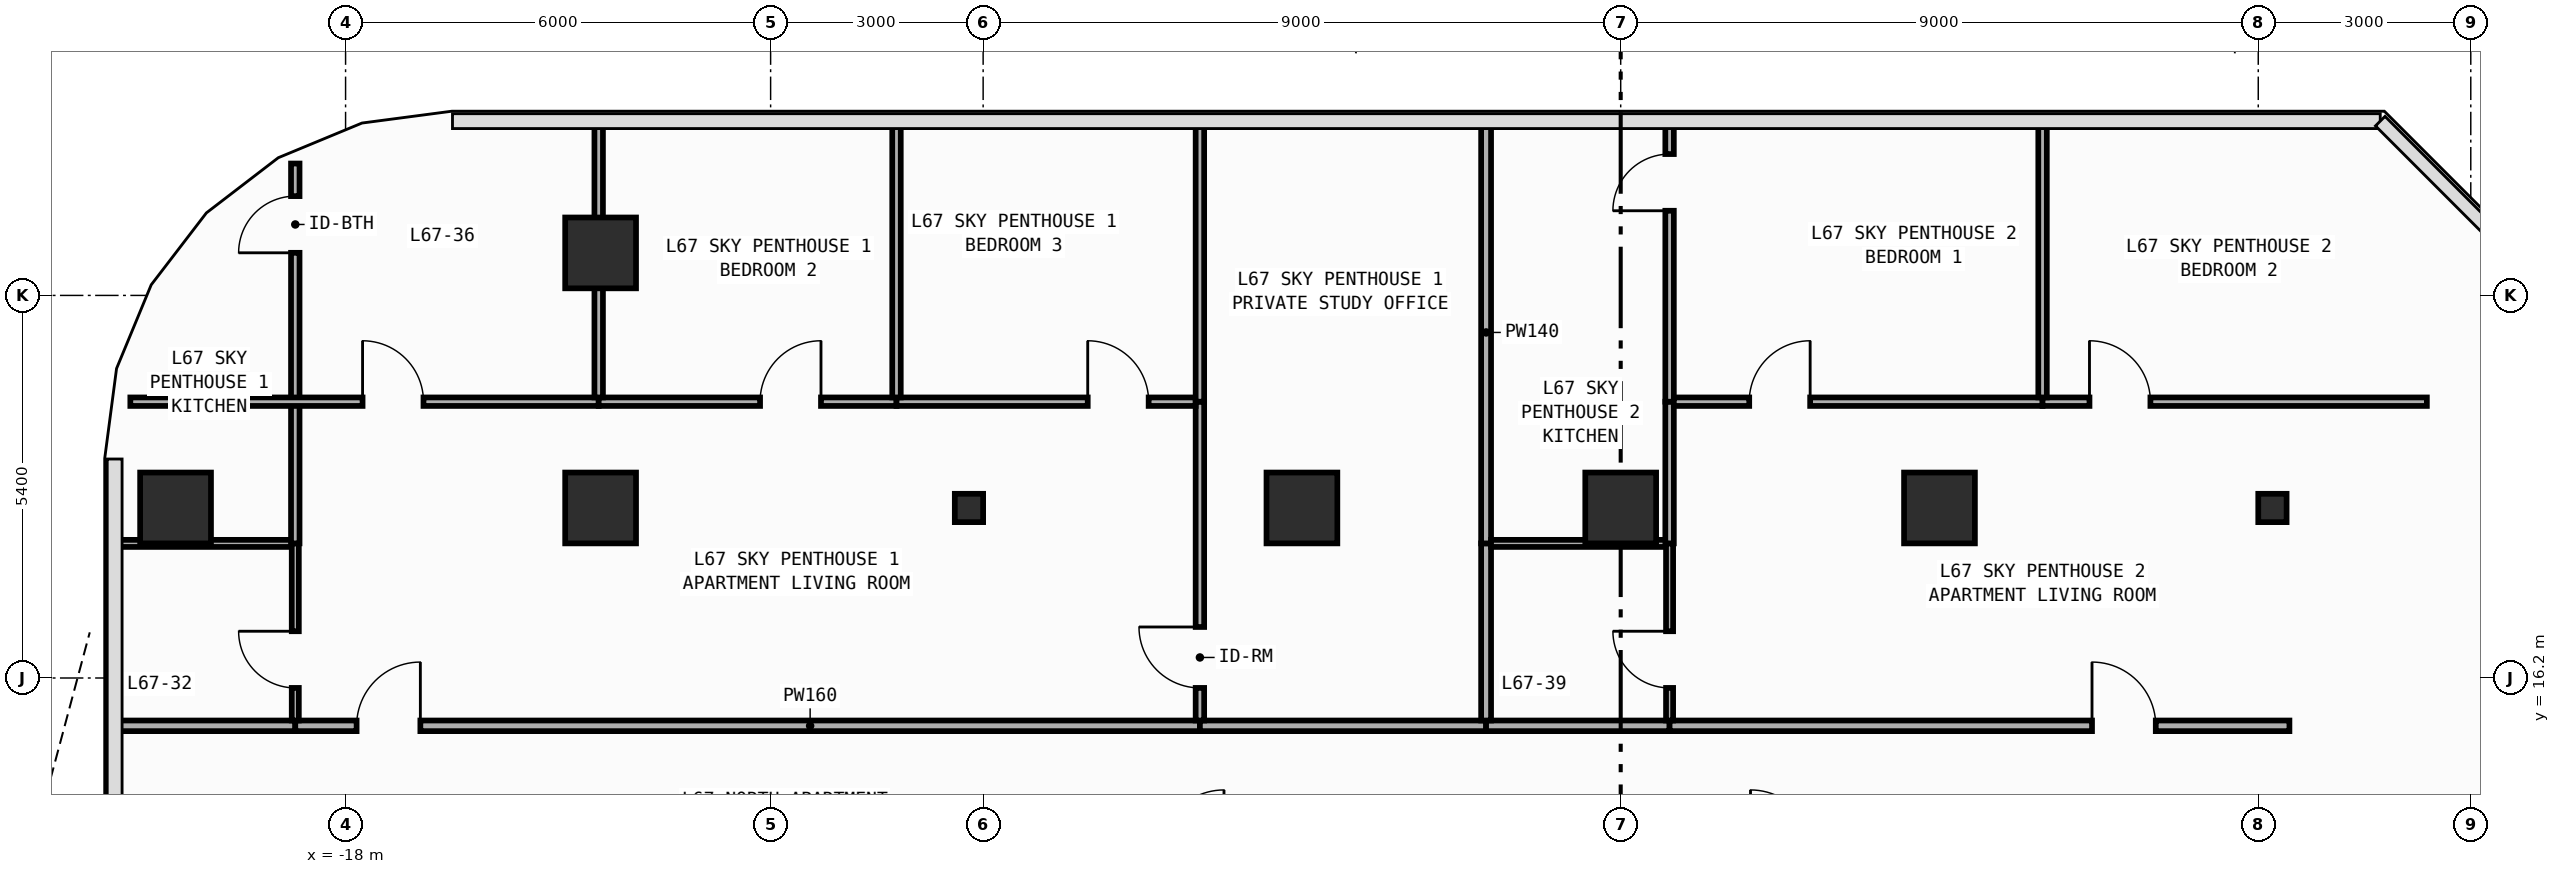
"""IFC4 building model, lengths in metres.
Left out: names, types, materials, properties, quantities, classifications, styles, units other than length and angle.
Written with IfcOpenShell. Run it as: python <this file> out.ifc"""

import sys

from ifc_helpers import new_model, si_unit, direction, frame, frame_2d, origin, origin_2d, place, context, subcontext, project, spatial, rectangle, circle, i_section, extrude, element, fill, save


model = new_model("IFC4")
c1 = context("Model", 3, precision=1e-05, world=origin(), true_north=direction((0.0, 1.0)))
c2 = subcontext(c1, "Body", "Model", "MODEL_VIEW")
j1 = project(units=[si_unit("LENGTHUNIT", "METRE"), si_unit("PLANEANGLEUNIT", "RADIAN")], contexts=[c1])
p1 = place(None, origin())
s1 = spatial("IfcSite", under=j1, at=p1, CompositionType="ELEMENT")
p2 = place(p1, origin())
s2 = spatial("IfcBuilding", under=s1, at=p2, CompositionType="ELEMENT")
p3 = place(p2, frame((0.0, 0.0, 281.4)))
s3 = spatial("IfcBuildingStorey", under=s2, at=p3, CompositionType="ELEMENT", Elevation=281.4)
for number, where, z_axis, x_axis in (
    (1, (-9.2, 18.6, 0.0), (0.0, 0.0, 1.0), (1.0, 0.0, 0.0)),
    (2, (9.2, 18.6, 0.0), (0.0, 0.0, 1.0), (1.0, 0.0, 0.0)),
):
    element("IfcColumn", number, at=place(p3, frame(where, z_axis=z_axis, x_axis=x_axis)), inside=s3, PredefinedType="COLUMN", context=c2, shape_type="SweptSolid", body=[
        extrude(i_section(OverallWidth=0.4, OverallDepth=0.4, WebThickness=0.013, FlangeThickness=0.021, FilletRadius=0.022, at=origin_2d()), origin(), (0.0, 0.0, 1.0), 3.8),
    ])
for number, where, z_axis, x_axis in (
    (3, (-20.4, 18.6, 0.0), (0.0, 0.0, 1.0), (1.0, 0.0, 0.0)),
    (4, (-14.4, 18.6, 0.0), (0.0, 0.0, 1.0), (1.0, 0.0, 0.0)),
    (5, (-4.5, 18.6, 0.0), (0.0, 0.0, 1.0), (1.0, 0.0, 0.0)),
    (6, (0.0, 18.6, 0.0), (0.0, 0.0, 1.0), (1.0, 0.0, 0.0)),
    (7, (4.5, 18.6, 0.0), (0.0, 0.0, 1.0), (1.0, 0.0, 0.0)),
    (8, (-14.4, 22.2, 0.0), (0.0, 0.0, 1.0), (1.0, 0.0, 0.0)),
):
    element("IfcColumn", number, at=place(p3, frame(where, z_axis=z_axis, x_axis=x_axis)), inside=s3, PredefinedType="COLUMN", context=c2, shape_type="SweptSolid", body=[
        extrude(circle(Radius=0.5, at=origin_2d()), origin(), (0.0, 0.0, 1.0), 3.8),
    ])
p4 = place(p3, frame((-21.255, 15.525, 0.0), z_axis=(0.0, 0.0, 1.0), x_axis=(1.0, 0.0, 0.0)))
e9 = element("IfcWall", 9, at=p4, inside=s3, PredefinedType="PARTITIONING", context=c2, shape_type="SweptSolid", body=[
    extrude(rectangle(XDim=2.545, YDim=0.15, at=frame_2d((1.272, 0.0))), origin(), (0.0, 0.0, 1.0), 3.54),
])
p5 = place(p3, frame((-18.71, 15.525, 0.0), z_axis=(0.0, 0.0, 1.0), x_axis=(1.0, 0.0, 0.0)))
e10 = element("IfcWall", 10, at=p5, inside=s3, PredefinedType="PARTITIONING", context=c2, shape_type="SweptSolid", body=[
    extrude(rectangle(XDim=12.77, YDim=0.15, at=frame_2d((6.385, 0.0))), origin(), (0.0, 0.0, 1.0), 3.54),
])
p6 = place(p5, frame((0.865, 0.0, 0.0)))
e11 = element("IfcOpeningElement", 11, at=p6, cuts=e10, PredefinedType="OPENING", context=c2, shape_type="SweptSolid", body=[
    extrude(rectangle(XDim=0.9, YDim=2.15, at=frame_2d((0.45, 1.075))), frame((0.0, 0.085, 0.0), z_axis=(0.0, -1.0, 0.0), x_axis=(1.0, 0.0, 0.0)), (0.0, 0.0, 1.0), 0.17),
])
p7 = place(p3, frame((-5.94, 15.525, 0.0), z_axis=(0.0, 0.0, 1.0), x_axis=(1.0, 0.0, 0.0)))
e12 = element("IfcWall", 12, at=p7, inside=s3, PredefinedType="PARTITIONING", context=c2, shape_type="SweptSolid", body=[
    extrude(rectangle(XDim=4.04, YDim=0.15, at=frame_2d((2.02, 0.0))), origin(), (0.0, 0.0, 1.0), 3.54),
])
p8 = place(p3, frame((-1.9, 15.525, 0.0), z_axis=(0.0, 0.0, 1.0), x_axis=(1.0, 0.0, 0.0)))
e13 = element("IfcWall", 13, at=p8, inside=s3, PredefinedType="PARTITIONING", context=c2, shape_type="SweptSolid", body=[
    extrude(rectangle(XDim=2.59, YDim=0.15, at=frame_2d((1.295, 0.0))), origin(), (0.0, 0.0, 1.0), 3.54),
])
p9 = place(p3, frame((0.69, 15.525, 0.0), z_axis=(0.0, 0.0, 1.0), x_axis=(1.0, 0.0, 0.0)))
e14 = element("IfcWall", 14, at=p9, inside=s3, PredefinedType="PARTITIONING", context=c2, shape_type="SweptSolid", body=[
    extrude(rectangle(XDim=8.75, YDim=0.15, at=frame_2d((4.375, 0.0))), origin(), (0.0, 0.0, 1.0), 3.54),
])
p10 = place(p9, frame((5.963, 0.0, 0.0)))
e15 = element("IfcOpeningElement", 15, at=p10, cuts=e14, PredefinedType="OPENING", context=c2, shape_type="SweptSolid", body=[
    extrude(rectangle(XDim=0.9, YDim=2.15, at=frame_2d((0.45, 1.075))), frame((0.0, 0.085, 0.0), z_axis=(0.0, -1.0, 0.0), x_axis=(1.0, 0.0, 0.0)), (0.0, 0.0, 1.0), 0.17),
])
p11 = place(p3, frame((-21.255, 18.1, 0.0), z_axis=(0.0, 0.0, 1.0), x_axis=(1.0, 0.0, 0.0)))
e16 = element("IfcWall", 16, at=p11, inside=s3, PredefinedType="PARTITIONING", context=c2, shape_type="SweptSolid", body=[
    extrude(rectangle(XDim=2.495, YDim=0.1, at=frame_2d((1.248, 0.0))), origin(), (0.0, 0.0, 1.0), 3.54),
])
p12 = place(p3, frame((-18.71, 15.6, 0.0), z_axis=(0.0, 0.0, 1.0), x_axis=(0.0, 1.0, 0.0)))
e17 = element("IfcWall", 17, at=p12, inside=s3, PredefinedType="PARTITIONING", context=c2, shape_type="SweptSolid", body=[
    extrude(rectangle(XDim=2.5, YDim=0.1, at=frame_2d((1.25, 0.0))), origin(), (0.0, 0.0, 1.0), 3.54),
])
p13 = place(p12, frame((0.46, 0.0, 0.0)))
e18 = element("IfcOpeningElement", 18, at=p13, cuts=e17, PredefinedType="OPENING", context=c2, shape_type="SweptSolid", body=[
    extrude(rectangle(XDim=0.8, YDim=2.1, at=frame_2d((0.4, 1.05))), frame((0.0, 0.06, 0.0), z_axis=(0.0, -1.0, 0.0), x_axis=(1.0, 0.0, 0.0)), (0.0, 0.0, 1.0), 0.12),
])
p14 = place(p3, frame((-18.71, 18.1, 0.0), z_axis=(0.0, 0.0, 1.0), x_axis=(0.0, 1.0, 0.0)))
e19 = element("IfcWall", 19, at=p14, inside=s3, PredefinedType="PARTITIONING", context=c2, shape_type="SweptSolid", body=[
    extrude(rectangle(XDim=2.0, YDim=0.12, at=frame_2d((1.0, 0.0))), origin(), (0.0, 0.0, 1.0), 3.54),
])
p15 = place(p3, frame((-18.71, 20.1, 0.0), z_axis=(0.0, 0.0, 1.0), x_axis=(0.0, 1.0, 0.0)))
e20 = element("IfcWall", 20, at=p15, inside=s3, PredefinedType="PARTITIONING", context=c2, shape_type="SweptSolid", body=[
    extrude(rectangle(XDim=3.361, YDim=0.12, at=frame_2d((1.681, 0.0))), origin(), (0.0, 0.0, 1.0), 3.54),
])
p16 = place(p15, frame((2.102, 0.0, 0.0)))
e21 = element("IfcOpeningElement", 21, at=p16, cuts=e20, PredefinedType="OPENING", context=c2, shape_type="SweptSolid", body=[
    extrude(rectangle(XDim=0.8, YDim=2.1, at=frame_2d((0.4, 1.05))), frame((0.0, 0.07, 0.0), z_axis=(0.0, -1.0, 0.0), x_axis=(1.0, 0.0, 0.0)), (0.0, 0.0, 1.0), 0.14),
])
p17 = place(p3, frame((-5.94, 15.6, 0.0), z_axis=(0.0, 0.0, 1.0), x_axis=(0.0, 1.0, 0.0)))
e22 = element("IfcWall", 22, at=p17, inside=s3, PredefinedType="PARTITIONING", context=c2, shape_type="SweptSolid", body=[
    extrude(rectangle(XDim=4.5, YDim=0.12, at=frame_2d((2.25, 0.0))), origin(), (0.0, 0.0, 1.0), 3.54),
])
p18 = place(p17, frame((0.46, 0.0, 0.0)))
e23 = element("IfcOpeningElement", 23, at=p18, cuts=e22, PredefinedType="OPENING", context=c2, shape_type="SweptSolid", body=[
    extrude(rectangle(XDim=0.86, YDim=2.15, at=frame_2d((0.43, 1.075))), frame((0.0, 0.07, 0.0), z_axis=(0.0, -1.0, 0.0), x_axis=(1.0, 0.0, 0.0)), (0.0, 0.0, 1.0), 0.14),
])
p19 = place(p3, frame((-21.039, 20.1, 0.0), z_axis=(0.0, 0.0, 1.0), x_axis=(1.0, 0.0, 0.0)))
e24 = element("IfcWall", 24, at=p19, inside=s3, PredefinedType="PARTITIONING", context=c2, shape_type="SweptSolid", body=[
    extrude(rectangle(XDim=6.612, YDim=0.12, at=frame_2d((3.306, 0.0))), origin(), (0.0, 0.0, 1.0), 3.54),
])
p20 = place(p19, frame((3.278, 0.0, 0.0)))
e25 = element("IfcOpeningElement", 25, at=p20, cuts=e24, PredefinedType="OPENING", context=c2, shape_type="SweptSolid", body=[
    extrude(rectangle(XDim=0.86, YDim=2.15, at=frame_2d((0.43, 1.075))), frame((0.0, 0.07, 0.0), z_axis=(0.0, -1.0, 0.0), x_axis=(1.0, 0.0, 0.0)), (0.0, 0.0, 1.0), 0.14),
])
p21 = place(p3, frame((-14.427, 20.1, 0.0), z_axis=(0.0, 0.0, 1.0), x_axis=(1.0, 0.0, 0.0)))
e26 = element("IfcWall", 26, at=p21, inside=s3, PredefinedType="PARTITIONING", context=c2, shape_type="SweptSolid", body=[
    extrude(rectangle(XDim=4.204, YDim=0.12, at=frame_2d((2.102, 0.0))), origin(), (0.0, 0.0, 1.0), 3.54),
])
p22 = place(p21, frame((2.278, 0.0, 0.0)))
e27 = element("IfcOpeningElement", 27, at=p22, cuts=e26, PredefinedType="OPENING", context=c2, shape_type="SweptSolid", body=[
    extrude(rectangle(XDim=0.86, YDim=2.15, at=frame_2d((0.43, 1.075))), frame((0.0, 0.07, 0.0), z_axis=(0.0, -1.0, 0.0), x_axis=(1.0, 0.0, 0.0)), (0.0, 0.0, 1.0), 0.14),
])
p23 = place(p3, frame((-10.223, 20.1, 0.0), z_axis=(0.0, 0.0, 1.0), x_axis=(1.0, 0.0, 0.0)))
e28 = element("IfcWall", 28, at=p23, inside=s3, PredefinedType="PARTITIONING", context=c2, shape_type="SweptSolid", body=[
    extrude(rectangle(XDim=4.223, YDim=0.12, at=frame_2d((2.111, 0.0))), origin(), (0.0, 0.0, 1.0), 3.54),
])
p24 = place(p23, frame((2.699, 0.0, 0.0)))
e29 = element("IfcOpeningElement", 29, at=p24, cuts=e28, PredefinedType="OPENING", context=c2, shape_type="SweptSolid", body=[
    extrude(rectangle(XDim=0.86, YDim=2.15, at=frame_2d((0.43, 1.075))), frame((0.0, 0.07, 0.0), z_axis=(0.0, -1.0, 0.0), x_axis=(1.0, 0.0, 0.0)), (0.0, 0.0, 1.0), 0.14),
])
p25 = place(p3, frame((-5.94, 20.1, 0.0), z_axis=(0.0, 0.0, 1.0), x_axis=(0.0, 1.0, 0.0)))
e30 = element("IfcWall", 30, at=p25, inside=s3, PredefinedType="PARTITIONING", context=c2, shape_type="SweptSolid", body=[
    extrude(rectangle(XDim=3.955, YDim=0.12, at=frame_2d((1.978, 0.0))), origin(), (0.0, 0.0, 1.0), 3.54),
])
p26 = place(p3, frame((-1.9, 15.6, 0.0), z_axis=(0.0, 0.0, 1.0), x_axis=(0.0, 1.0, 0.0)))
e31 = element("IfcWall", 31, at=p26, inside=s3, PredefinedType="PARTITIONING", context=c2, shape_type="SweptSolid", body=[
    extrude(rectangle(XDim=2.5, YDim=0.14, at=frame_2d((1.25, 0.0))), origin(), (0.0, 0.0, 1.0), 3.54),
])
p27 = place(p3, frame((-1.9, 18.1, 0.0), z_axis=(0.0, 0.0, 1.0), x_axis=(0.0, 1.0, 0.0)))
e32 = element("IfcWall", 32, at=p27, inside=s3, PredefinedType="PARTITIONING", context=c2, shape_type="SweptSolid", body=[
    extrude(rectangle(XDim=5.955, YDim=0.14, at=frame_2d((2.978, 0.0))), origin(), (0.0, 0.0, 1.0), 3.54),
])
p28 = place(p3, frame((-14.427, 20.16, 0.0), z_axis=(0.0, 0.0, 1.0), x_axis=(0.0, 1.0, 0.0)))
e33 = element("IfcWall", 33, at=p28, inside=s3, PredefinedType="PARTITIONING", context=c2, shape_type="SweptSolid", body=[
    extrude(rectangle(XDim=3.895, YDim=0.12, at=frame_2d((1.948, 0.0))), origin(), (0.0, 0.0, 1.0), 2.64),
])
p29 = place(p3, frame((-10.223, 20.16, 0.0), z_axis=(0.0, 0.0, 1.0), x_axis=(0.0, 1.0, 0.0)))
e34 = element("IfcWall", 34, at=p29, inside=s3, PredefinedType="PARTITIONING", context=c2, shape_type="SweptSolid", body=[
    extrude(rectangle(XDim=3.895, YDim=0.12, at=frame_2d((1.948, 0.0))), origin(), (0.0, 0.0, 1.0), 3.54),
])
p30 = place(p3, frame((-1.83, 18.1, 0.0), z_axis=(0.0, 0.0, 1.0), x_axis=(1.0, 0.0, 0.0)))
e35 = element("IfcWall", 35, at=p30, inside=s3, PredefinedType="PARTITIONING", context=c2, shape_type="SweptSolid", body=[
    extrude(rectangle(XDim=2.47, YDim=0.1, at=frame_2d((1.235, 0.0))), origin(), (0.0, 0.0, 1.0), 3.54),
])
p31 = place(p3, frame((0.69, 15.6, 0.0), z_axis=(0.0, 0.0, 1.0), x_axis=(0.0, 1.0, 0.0)))
e36 = element("IfcWall", 36, at=p31, inside=s3, PredefinedType="PARTITIONING", context=c2, shape_type="SweptSolid", body=[
    extrude(rectangle(XDim=2.5, YDim=0.1, at=frame_2d((1.25, 0.0))), origin(), (0.0, 0.0, 1.0), 3.54),
])
p32 = place(p31, frame((0.46, 0.0, 0.0)))
e37 = element("IfcOpeningElement", 37, at=p32, cuts=e36, PredefinedType="OPENING", context=c2, shape_type="SweptSolid", body=[
    extrude(rectangle(XDim=0.8, YDim=2.1, at=frame_2d((0.4, 1.05))), frame((0.0, 0.06, 0.0), z_axis=(0.0, -1.0, 0.0), x_axis=(1.0, 0.0, 0.0)), (0.0, 0.0, 1.0), 0.12),
])
p33 = place(p3, frame((0.69, 18.1, 0.0), z_axis=(0.0, 0.0, 1.0), x_axis=(0.0, 1.0, 0.0)))
e38 = element("IfcWall", 38, at=p33, inside=s3, PredefinedType="PARTITIONING", context=c2, shape_type="SweptSolid", body=[
    extrude(rectangle(XDim=2.0, YDim=0.12, at=frame_2d((1.0, 0.0))), origin(), (0.0, 0.0, 1.0), 3.54),
])
p34 = place(p3, frame((0.69, 20.1, 0.0), z_axis=(0.0, 0.0, 1.0), x_axis=(0.0, 1.0, 0.0)))
e39 = element("IfcWall", 39, at=p34, inside=s3, PredefinedType="PARTITIONING", context=c2, shape_type="SweptSolid", body=[
    extrude(rectangle(XDim=3.955, YDim=0.12, at=frame_2d((1.978, 0.0))), origin(), (0.0, 0.0, 1.0), 3.54),
])
p35 = place(p34, frame((2.695, 0.0, 0.0)))
e40 = element("IfcOpeningElement", 40, at=p35, cuts=e39, PredefinedType="OPENING", context=c2, shape_type="SweptSolid", body=[
    extrude(rectangle(XDim=0.8, YDim=2.1, at=frame_2d((0.4, 1.05))), frame((0.0, 0.07, 0.0), z_axis=(0.0, -1.0, 0.0), x_axis=(1.0, 0.0, 0.0)), (0.0, 0.0, 1.0), 0.14),
])
p36 = place(p3, frame((0.75, 20.1, 0.0), z_axis=(0.0, 0.0, 1.0), x_axis=(1.0, 0.0, 0.0)))
e41 = element("IfcWall", 41, at=p36, inside=s3, PredefinedType="PARTITIONING", context=c2, shape_type="SweptSolid", body=[
    extrude(rectangle(XDim=5.205, YDim=0.12, at=frame_2d((2.603, 0.0))), origin(), (0.0, 0.0, 1.0), 3.54),
])
p37 = place(p36, frame((1.064, 0.0, 0.0)))
e42 = element("IfcOpeningElement", 42, at=p37, cuts=e41, PredefinedType="OPENING", context=c2, shape_type="SweptSolid", body=[
    extrude(rectangle(XDim=0.86, YDim=2.15, at=frame_2d((0.43, 1.075))), frame((0.0, 0.07, 0.0), z_axis=(0.0, -1.0, 0.0), x_axis=(1.0, 0.0, 0.0)), (0.0, 0.0, 1.0), 0.14),
])
p38 = place(p3, frame((5.955, 20.1, 0.0), z_axis=(0.0, 0.0, 1.0), x_axis=(1.0, 0.0, 0.0)))
e43 = element("IfcWall", 43, at=p38, inside=s3, PredefinedType="PARTITIONING", context=c2, shape_type="SweptSolid", body=[
    extrude(rectangle(XDim=5.425, YDim=0.12, at=frame_2d((2.712, 0.0))), origin(), (0.0, 0.0, 1.0), 3.54),
])
p39 = place(p38, frame((0.663, 0.0, 0.0)))
e44 = element("IfcOpeningElement", 44, at=p39, cuts=e43, PredefinedType="OPENING", context=c2, shape_type="SweptSolid", body=[
    extrude(rectangle(XDim=0.86, YDim=2.15, at=frame_2d((0.43, 1.075))), frame((0.0, 0.07, 0.0), z_axis=(0.0, -1.0, 0.0), x_axis=(1.0, 0.0, 0.0)), (0.0, 0.0, 1.0), 0.14),
])
p40 = place(p3, frame((5.955, 20.16, 0.0), z_axis=(0.0, 0.0, 1.0), x_axis=(0.0, 1.0, 0.0)))
e45 = element("IfcWall", 45, at=p40, inside=s3, PredefinedType="PARTITIONING", context=c2, shape_type="SweptSolid", body=[
    extrude(rectangle(XDim=3.895, YDim=0.12, at=frame_2d((1.948, 0.0))), origin(), (0.0, 0.0, 1.0), 3.54),
])
p41 = place(p6, origin())
e46 = element("IfcDoor", 46, at=p41, inside=s3, OperationType="SINGLE_SWING_RIGHT", PredefinedType="DOOR", context=c2, shape_type="SweptSolid", body=[
    extrude(rectangle(XDim=0.9, YDim=2.15, at=frame_2d((0.45, 1.075))), frame((0.0, 0.025, 0.0), z_axis=(0.0, -1.0, 0.0), x_axis=(1.0, 0.0, 0.0)), (0.0, 0.0, 1.0), 0.05),
])
fill(e11, e46)
p42 = place(p10, origin())
e47 = element("IfcDoor", 47, at=p42, inside=s3, OperationType="SINGLE_SWING_LEFT", PredefinedType="DOOR", context=c2, shape_type="SweptSolid", body=[
    extrude(rectangle(XDim=0.9, YDim=2.15, at=frame_2d((0.45, 1.075))), frame((0.0, 0.025, 0.0), z_axis=(0.0, -1.0, 0.0), x_axis=(1.0, 0.0, 0.0)), (0.0, 0.0, 1.0), 0.05),
])
fill(e15, e47)
p43 = place(p13, origin())
e48 = element("IfcDoor", 48, at=p43, inside=s3, OperationType="SINGLE_SWING_RIGHT", PredefinedType="DOOR", context=c2, shape_type="SweptSolid", body=[
    extrude(rectangle(XDim=0.8, YDim=2.1, at=frame_2d((0.4, 1.05))), frame((0.0, 0.025, 0.0), z_axis=(0.0, -1.0, 0.0), x_axis=(1.0, 0.0, 0.0)), (0.0, 0.0, 1.0), 0.05),
])
fill(e18, e48)
p44 = place(p18, origin())
e49 = element("IfcDoor", 49, at=p44, inside=s3, OperationType="SINGLE_SWING_RIGHT", PredefinedType="DOOR", context=c2, shape_type="SweptSolid", body=[
    extrude(rectangle(XDim=0.86, YDim=2.15, at=frame_2d((0.43, 1.075))), frame((0.0, 0.025, 0.0), z_axis=(0.0, -1.0, 0.0), x_axis=(1.0, 0.0, 0.0)), (0.0, 0.0, 1.0), 0.05),
])
fill(e23, e49)
p45 = place(p20, origin())
e50 = element("IfcDoor", 50, at=p45, inside=s3, OperationType="SINGLE_SWING_LEFT", PredefinedType="DOOR", context=c2, shape_type="SweptSolid", body=[
    extrude(rectangle(XDim=0.86, YDim=2.15, at=frame_2d((0.43, 1.075))), frame((0.0, 0.025, 0.0), z_axis=(0.0, -1.0, 0.0), x_axis=(1.0, 0.0, 0.0)), (0.0, 0.0, 1.0), 0.05),
])
fill(e25, e50)
p46 = place(p22, origin())
e51 = element("IfcDoor", 51, at=p46, inside=s3, OperationType="SINGLE_SWING_RIGHT", PredefinedType="DOOR", context=c2, shape_type="SweptSolid", body=[
    extrude(rectangle(XDim=0.86, YDim=2.15, at=frame_2d((0.43, 1.075))), frame((0.0, 0.025, 0.0), z_axis=(0.0, -1.0, 0.0), x_axis=(1.0, 0.0, 0.0)), (0.0, 0.0, 1.0), 0.05),
])
fill(e27, e51)
p47 = place(p24, origin())
e52 = element("IfcDoor", 52, at=p47, inside=s3, OperationType="SINGLE_SWING_LEFT", PredefinedType="DOOR", context=c2, shape_type="SweptSolid", body=[
    extrude(rectangle(XDim=0.86, YDim=2.15, at=frame_2d((0.43, 1.075))), frame((0.0, 0.025, 0.0), z_axis=(0.0, -1.0, 0.0), x_axis=(1.0, 0.0, 0.0)), (0.0, 0.0, 1.0), 0.05),
])
fill(e29, e52)
p48 = place(p32, origin())
e53 = element("IfcDoor", 53, at=p48, inside=s3, OperationType="SINGLE_SWING_RIGHT", PredefinedType="DOOR", context=c2, shape_type="SweptSolid", body=[
    extrude(rectangle(XDim=0.8, YDim=2.1, at=frame_2d((0.4, 1.05))), frame((0.0, 0.025, 0.0), z_axis=(0.0, -1.0, 0.0), x_axis=(1.0, 0.0, 0.0)), (0.0, 0.0, 1.0), 0.05),
])
fill(e37, e53)
p49 = place(p37, origin())
e54 = element("IfcDoor", 54, at=p49, inside=s3, OperationType="SINGLE_SWING_RIGHT", PredefinedType="DOOR", context=c2, shape_type="SweptSolid", body=[
    extrude(rectangle(XDim=0.86, YDim=2.15, at=frame_2d((0.43, 1.075))), frame((0.0, 0.025, 0.0), z_axis=(0.0, -1.0, 0.0), x_axis=(1.0, 0.0, 0.0)), (0.0, 0.0, 1.0), 0.05),
])
fill(e42, e54)
p50 = place(p39, origin())
e55 = element("IfcDoor", 55, at=p50, inside=s3, OperationType="SINGLE_SWING_LEFT", PredefinedType="DOOR", context=c2, shape_type="SweptSolid", body=[
    extrude(rectangle(XDim=0.86, YDim=2.15, at=frame_2d((0.43, 1.075))), frame((0.0, 0.025, 0.0), z_axis=(0.0, -1.0, 0.0), x_axis=(1.0, 0.0, 0.0)), (0.0, 0.0, 1.0), 0.05),
])
fill(e44, e55)
p51 = place(p35, origin())
e56 = element("IfcDoor", 56, at=p51, inside=s3, OperationType="SINGLE_SWING_LEFT", PredefinedType="DOOR", context=c2, shape_type="SweptSolid", body=[
    extrude(rectangle(XDim=0.8, YDim=2.1, at=frame_2d((0.4, 1.05))), frame((0.0, 0.025, 0.0), z_axis=(0.0, -1.0, 0.0), x_axis=(1.0, 0.0, 0.0)), (0.0, 0.0, 1.0), 0.05),
])
fill(e40, e56)
p52 = place(p16, origin())
e57 = element("IfcDoor", 57, at=p52, inside=s3, OperationType="SINGLE_SWING_LEFT", PredefinedType="DOOR", context=c2, shape_type="SweptSolid", body=[
    extrude(rectangle(XDim=0.8, YDim=2.1, at=frame_2d((0.4, 1.05))), frame((0.0, 0.025, 0.0), z_axis=(0.0, -1.0, 0.0), x_axis=(1.0, 0.0, 0.0)), (0.0, 0.0, 1.0), 0.05),
])
fill(e21, e57)
save(model, sys.argv[1])
